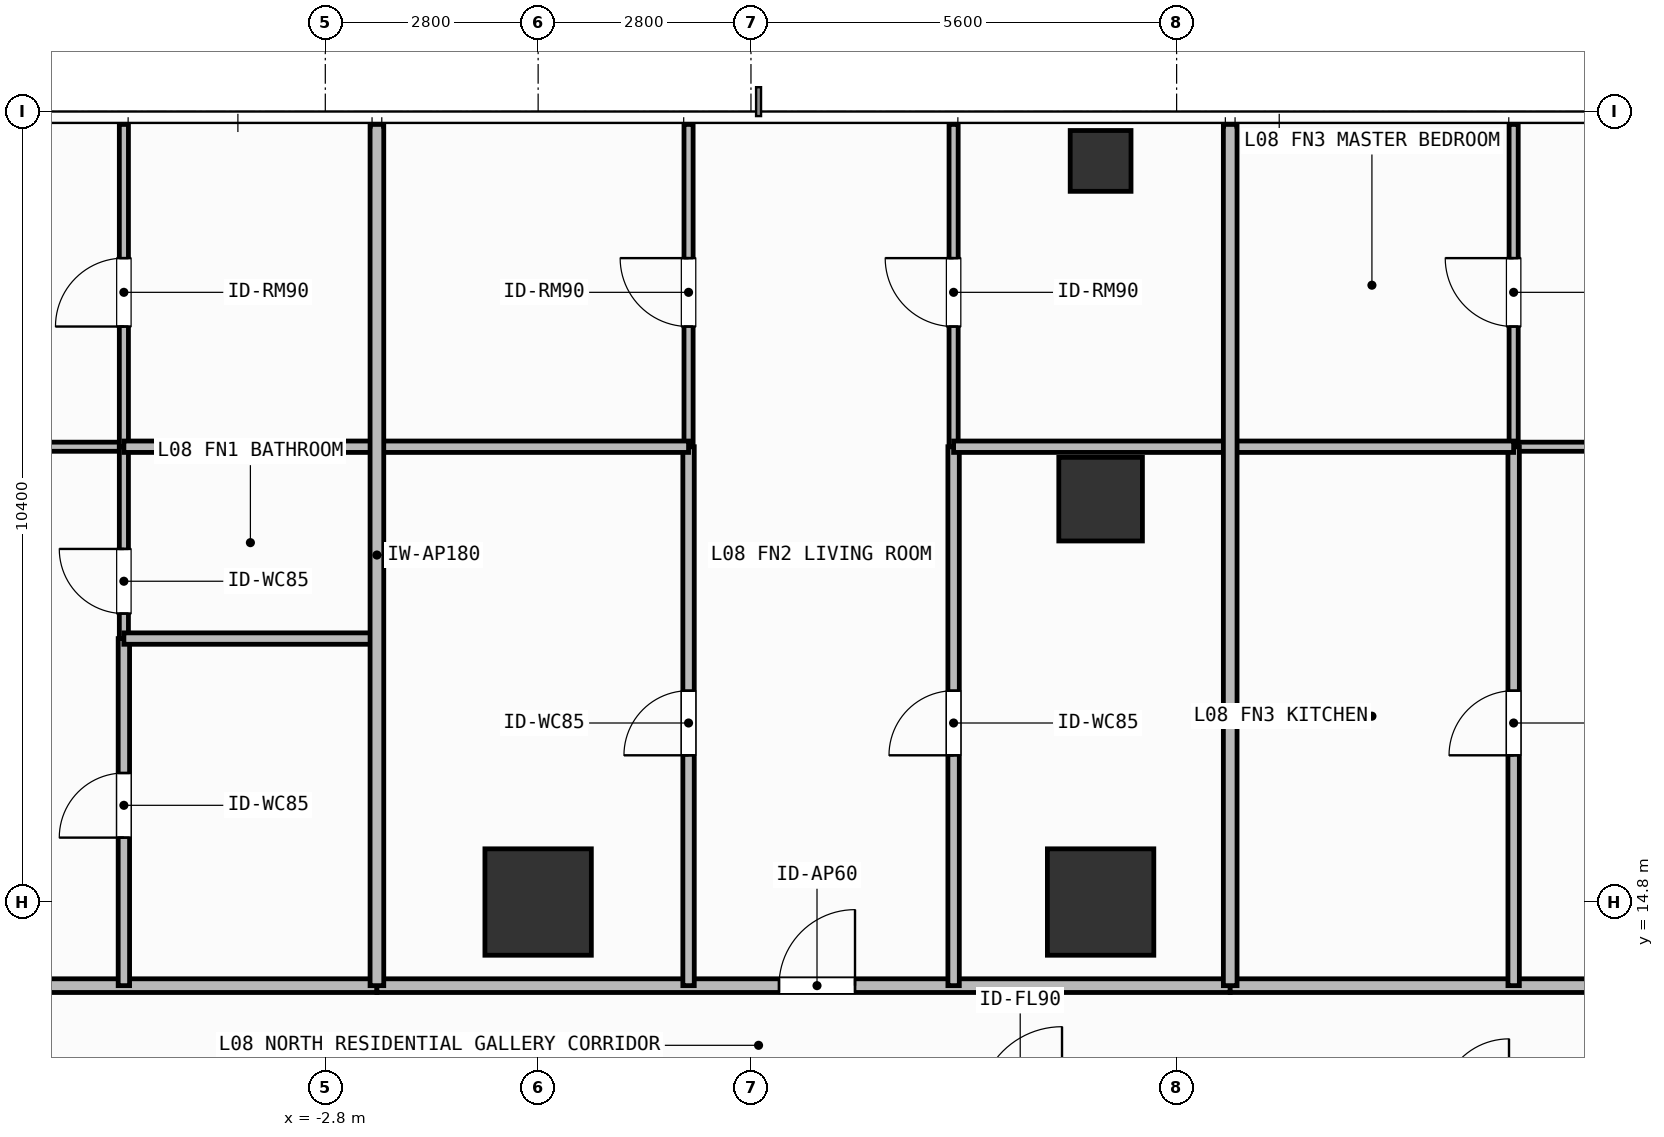
"""IFC4 building model, lengths in metres.
Left out: names, types, materials, properties, quantities, classifications, styles, units other than length and angle.
Written with IfcOpenShell. Run it as: python <this file> out.ifc"""

import sys

from ifc_helpers import new_model, si_unit, direction, frame, frame_2d, origin, origin_2d, place, context, subcontext, project, spatial, rectangle, hollow_rectangle, extrude, element, fill, save


model = new_model("IFC4")
c1 = context("Model", 3, precision=1e-05, world=origin(), true_north=direction((0.0, 1.0)))
c2 = subcontext(c1, "Body", "Model", "MODEL_VIEW")
j1 = project(units=[si_unit("LENGTHUNIT", "METRE"), si_unit("PLANEANGLEUNIT", "RADIAN")], contexts=[c1])
p1 = place(None, origin())
s1 = spatial("IfcSite", under=j1, at=p1, CompositionType="ELEMENT")
p2 = place(p1, origin())
s2 = spatial("IfcBuilding", under=s1, at=p2, CompositionType="ELEMENT")
p3 = place(p2, frame((0.0, 0.0, 30.6)))
s3 = spatial("IfcBuildingStorey", under=s2, at=p3, CompositionType="ELEMENT", Elevation=30.6)
for number, where, z_axis, x_axis in (
    (1, (0.0, 14.8, 0.0), (0.0, 0.0, 1.0), (1.0, 0.0, 0.0)),
    (2, (7.4, 14.8, 0.0), (0.0, 0.0, 1.0), (1.0, 0.0, 0.0)),
):
    element("IfcColumn", number, at=place(p3, frame(where, z_axis=z_axis, x_axis=x_axis)), inside=s3, PredefinedType="COLUMN", context=c2, shape_type="SweptSolid", body=[
        extrude(rectangle(XDim=1.4, YDim=1.4, at=origin_2d()), origin(), (0.0, 0.0, 1.0), 3.9),
    ])
p4 = place(p3, frame((7.4, 20.1, 0.0), z_axis=(0.0, 0.0, 1.0), x_axis=(1.0, 0.0, 0.0)))
e3 = element("IfcColumn", 3, at=p4, inside=s3, PredefinedType="COLUMN", context=c2, shape_type="SweptSolid", body=[
    extrude(rectangle(XDim=1.1, YDim=1.1, at=origin_2d()), origin(), (0.0, 0.0, 1.0), 3.9),
])
p5 = place(p3, frame((7.4, 24.55, 0.0), z_axis=(0.0, 0.0, 1.0), x_axis=(1.0, 0.0, 0.0)))
e4 = element("IfcColumn", 4, at=p5, inside=s3, PredefinedType="COLUMN", context=c2, shape_type="SweptSolid", body=[
    extrude(hollow_rectangle(XDim=0.8, YDim=0.8, WallThickness=0.036, at=origin_2d()), origin(), (0.0, 0.0, 1.0), 3.9),
])
p6 = place(p3, frame((-18.62, 13.7, 0.0), z_axis=(0.0, 0.0, 1.0), x_axis=(1.0, 0.0, 0.0)))
e5 = element("IfcWall", 5, at=p6, inside=s3, PredefinedType="PARTITIONING", context=c2, shape_type="SweptSolid", body=[
    extrude(rectangle(XDim=16.499, YDim=0.18, at=frame_2d((8.25, 0.0))), origin(), (0.0, 0.0, 1.0), 3.68),
])
p7 = place(p6, frame((8.91, 0.0, 0.0)))
e6 = element("IfcOpeningElement", 6, at=p7, cuts=e5, PredefinedType="OPENING", context=c2, shape_type="SweptSolid", body=[
    extrude(rectangle(XDim=1.0, YDim=2.2, at=frame_2d((0.5, 1.1))), frame((0.0, 0.1, 0.0), z_axis=(0.0, -1.0, 0.0), x_axis=(1.0, 0.0, 0.0)), (0.0, 0.0, 1.0), 0.2),
])
p8 = place(p3, frame((-12.818, 20.79, 0.0), z_axis=(0.0, 0.0, 1.0), x_axis=(1.0, 0.0, 0.0)))
e7 = element("IfcWall", 7, at=p8, inside=s3, PredefinedType="PARTITIONING", context=c2, shape_type="SweptSolid", body=[
    extrude(rectangle(XDim=7.368, YDim=0.12, at=frame_2d((3.684, 0.0))), origin(), (0.0, 0.0, 1.0), 3.68),
])
p9 = place(p8, frame((3.322, 0.0, 0.0)))
e8 = element("IfcOpeningElement", 8, at=p9, cuts=e7, PredefinedType="OPENING", context=c2, shape_type="SweptSolid", body=[
    extrude(rectangle(XDim=0.9, YDim=2.1, at=frame_2d((0.45, 1.05))), frame((0.0, 0.07, 0.0), z_axis=(0.0, -1.0, 0.0), x_axis=(1.0, 0.0, 0.0)), (0.0, 0.0, 1.0), 0.14),
])
p10 = place(p3, frame((-5.45, 13.7, 0.0), z_axis=(0.0, 0.0, 1.0), x_axis=(0.0, 1.0, 0.0)))
e9 = element("IfcWall", 9, at=p10, inside=s3, PredefinedType="PARTITIONING", context=c2, shape_type="SweptSolid", body=[
    extrude(rectangle(XDim=4.566, YDim=0.15, at=frame_2d((2.283, 0.0))), origin(), (0.0, 0.0, 1.0), 3.68),
])
p11 = place(p10, frame((1.948, 0.0, 0.0)))
e10 = element("IfcOpeningElement", 10, at=p11, cuts=e9, PredefinedType="OPENING", context=c2, shape_type="SweptSolid", body=[
    extrude(rectangle(XDim=0.85, YDim=2.1, at=frame_2d((0.425, 1.05))), frame((0.0, 0.085, 0.0), z_axis=(0.0, -1.0, 0.0), x_axis=(1.0, 0.0, 0.0)), (0.0, 0.0, 1.0), 0.17),
])
p12 = place(p3, frame((-5.45, 18.266, 0.0), z_axis=(0.0, 0.0, 1.0), x_axis=(0.0, 1.0, 0.0)))
e11 = element("IfcWall", 11, at=p12, inside=s3, PredefinedType="PARTITIONING", context=c2, shape_type="SweptSolid", body=[
    extrude(rectangle(XDim=2.524, YDim=0.12, at=frame_2d((1.262, 0.0))), origin(), (0.0, 0.0, 1.0), 3.68),
])
p13 = place(p12, frame((0.329, 0.0, 0.0)))
e12 = element("IfcOpeningElement", 12, at=p13, cuts=e11, PredefinedType="OPENING", context=c2, shape_type="SweptSolid", body=[
    extrude(rectangle(XDim=0.85, YDim=2.1, at=frame_2d((0.425, 1.05))), frame((0.0, 0.07, 0.0), z_axis=(0.0, -1.0, 0.0), x_axis=(1.0, 0.0, 0.0)), (0.0, 0.0, 1.0), 0.14),
])
p14 = place(p3, frame((-5.45, 20.79, 0.0), z_axis=(0.0, 0.0, 1.0), x_axis=(0.0, 1.0, 0.0)))
e13 = element("IfcWall", 13, at=p14, inside=s3, PredefinedType="PARTITIONING", context=c2, shape_type="SweptSolid", body=[
    extrude(rectangle(XDim=4.24, YDim=0.12, at=frame_2d((2.12, 0.0))), origin(), (0.0, 0.0, 1.0), 3.68),
])
p15 = place(p14, frame((1.581, 0.0, 0.0)))
e14 = element("IfcOpeningElement", 14, at=p15, cuts=e13, PredefinedType="OPENING", context=c2, shape_type="SweptSolid", body=[
    extrude(rectangle(XDim=0.9, YDim=2.1, at=frame_2d((0.45, 1.05))), frame((0.0, 0.07, 0.0), z_axis=(0.0, -1.0, 0.0), x_axis=(1.0, 0.0, 0.0)), (0.0, 0.0, 1.0), 0.14),
])
p16 = place(p3, frame((-2.121, 13.7, 0.0), z_axis=(0.0, 0.0, 1.0), x_axis=(1.0, 0.0, 0.0)))
e15 = element("IfcWall", 15, at=p16, inside=s3, PredefinedType="PARTITIONING", context=c2, shape_type="SweptSolid", body=[
    extrude(rectangle(XDim=11.226, YDim=0.18, at=frame_2d((5.613, 0.0))), origin(), (0.0, 0.0, 1.0), 3.68),
])
p17 = place(p16, frame((5.29, 0.0, 0.0)))
e16 = element("IfcOpeningElement", 16, at=p17, cuts=e15, PredefinedType="OPENING", context=c2, shape_type="SweptSolid", body=[
    extrude(rectangle(XDim=1.0, YDim=2.2, at=frame_2d((0.5, 1.1))), frame((0.0, 0.1, 0.0), z_axis=(0.0, -1.0, 0.0), x_axis=(1.0, 0.0, 0.0)), (0.0, 0.0, 1.0), 0.2),
])
p18 = place(p3, frame((1.979, 13.7, 0.0), z_axis=(0.0, 0.0, 1.0), x_axis=(0.0, 1.0, 0.0)))
e17 = element("IfcWall", 17, at=p18, inside=s3, PredefinedType="PARTITIONING", context=c2, shape_type="SweptSolid", body=[
    extrude(rectangle(XDim=7.09, YDim=0.15, at=frame_2d((3.545, 0.0))), origin(), (0.0, 0.0, 1.0), 3.68),
])
p19 = place(p18, frame((3.03, 0.0, 0.0)))
e18 = element("IfcOpeningElement", 18, at=p19, cuts=e17, PredefinedType="OPENING", context=c2, shape_type="SweptSolid", body=[
    extrude(rectangle(XDim=0.85, YDim=2.1, at=frame_2d((0.425, 1.05))), frame((0.0, 0.085, 0.0), z_axis=(0.0, -1.0, 0.0), x_axis=(1.0, 0.0, 0.0)), (0.0, 0.0, 1.0), 0.17),
])
p20 = place(p3, frame((1.979, 20.79, 0.0), z_axis=(0.0, 0.0, 1.0), x_axis=(0.0, 1.0, 0.0)))
e19 = element("IfcWall", 19, at=p20, inside=s3, PredefinedType="PARTITIONING", context=c2, shape_type="SweptSolid", body=[
    extrude(rectangle(XDim=4.24, YDim=0.12, at=frame_2d((2.12, 0.0))), origin(), (0.0, 0.0, 1.0), 3.68),
])
p21 = place(p20, frame((1.581, 0.0, 0.0)))
e20 = element("IfcOpeningElement", 20, at=p21, cuts=e19, PredefinedType="OPENING", context=c2, shape_type="SweptSolid", body=[
    extrude(rectangle(XDim=0.9, YDim=2.1, at=frame_2d((0.45, 1.05))), frame((0.0, 0.07, 0.0), z_axis=(0.0, -1.0, 0.0), x_axis=(1.0, 0.0, 0.0)), (0.0, 0.0, 1.0), 0.14),
])
p22 = place(p3, frame((5.466, 13.7, 0.0), z_axis=(0.0, 0.0, 1.0), x_axis=(0.0, 1.0, 0.0)))
e21 = element("IfcWall", 21, at=p22, inside=s3, PredefinedType="PARTITIONING", context=c2, shape_type="SweptSolid", body=[
    extrude(rectangle(XDim=7.09, YDim=0.15, at=frame_2d((3.545, 0.0))), origin(), (0.0, 0.0, 1.0), 3.68),
])
p23 = place(p22, frame((3.03, 0.0, 0.0)))
e22 = element("IfcOpeningElement", 22, at=p23, cuts=e21, PredefinedType="OPENING", context=c2, shape_type="SweptSolid", body=[
    extrude(rectangle(XDim=0.85, YDim=2.1, at=frame_2d((0.425, 1.05))), frame((0.0, 0.085, 0.0), z_axis=(0.0, -1.0, 0.0), x_axis=(1.0, 0.0, 0.0)), (0.0, 0.0, 1.0), 0.17),
])
p24 = place(p3, frame((5.466, 20.79, 0.0), z_axis=(0.0, 0.0, 1.0), x_axis=(0.0, 1.0, 0.0)))
e23 = element("IfcWall", 23, at=p24, inside=s3, PredefinedType="PARTITIONING", context=c2, shape_type="SweptSolid", body=[
    extrude(rectangle(XDim=4.24, YDim=0.12, at=frame_2d((2.12, 0.0))), origin(), (0.0, 0.0, 1.0), 3.68),
])
p25 = place(p24, frame((1.581, 0.0, 0.0)))
e24 = element("IfcOpeningElement", 24, at=p25, cuts=e23, PredefinedType="OPENING", context=c2, shape_type="SweptSolid", body=[
    extrude(rectangle(XDim=0.9, YDim=2.1, at=frame_2d((0.45, 1.05))), frame((0.0, 0.07, 0.0), z_axis=(0.0, -1.0, 0.0), x_axis=(1.0, 0.0, 0.0)), (0.0, 0.0, 1.0), 0.14),
])
p26 = place(p3, frame((9.105, 13.7, 0.0), z_axis=(0.0, 0.0, 1.0), x_axis=(1.0, 0.0, 0.0)))
e25 = element("IfcWall", 25, at=p26, inside=s3, PredefinedType="PARTITIONING", context=c2, shape_type="SweptSolid", body=[
    extrude(rectangle(XDim=15.315, YDim=0.18, at=frame_2d((7.657, 0.0))), origin(), (0.0, 0.0, 1.0), 3.68),
])
p27 = place(p26, frame((7.516, 0.0, 0.0)))
e26 = element("IfcOpeningElement", 26, at=p27, cuts=e25, PredefinedType="OPENING", context=c2, shape_type="SweptSolid", body=[
    extrude(rectangle(XDim=1.0, YDim=2.2, at=frame_2d((0.5, 1.1))), frame((0.0, 0.1, 0.0), z_axis=(0.0, -1.0, 0.0), x_axis=(1.0, 0.0, 0.0)), (0.0, 0.0, 1.0), 0.2),
])
p28 = place(p3, frame((12.834, 20.79, 0.0), z_axis=(0.0, 0.0, 1.0), x_axis=(1.0, 0.0, 0.0)))
e27 = element("IfcWall", 27, at=p28, inside=s3, PredefinedType="PARTITIONING", context=c2, shape_type="SweptSolid", body=[
    extrude(rectangle(XDim=8.496, YDim=0.12, at=frame_2d((4.248, 0.0))), origin(), (0.0, 0.0, 1.0), 3.68),
])
p29 = place(p28, frame((3.709, 0.0, 0.0)))
e28 = element("IfcOpeningElement", 28, at=p29, cuts=e27, PredefinedType="OPENING", context=c2, shape_type="SweptSolid", body=[
    extrude(rectangle(XDim=0.9, YDim=2.1, at=frame_2d((0.45, 1.05))), frame((0.0, 0.07, 0.0), z_axis=(0.0, -1.0, 0.0), x_axis=(1.0, 0.0, 0.0)), (0.0, 0.0, 1.0), 0.14),
])
p30 = place(p3, frame((12.834, 13.7, 0.0), z_axis=(0.0, 0.0, 1.0), x_axis=(0.0, 1.0, 0.0)))
e29 = element("IfcWall", 29, at=p30, inside=s3, PredefinedType="PARTITIONING", context=c2, shape_type="SweptSolid", body=[
    extrude(rectangle(XDim=7.09, YDim=0.15, at=frame_2d((3.545, 0.0))), origin(), (0.0, 0.0, 1.0), 3.68),
])
p31 = place(p30, frame((3.03, 0.0, 0.0)))
e30 = element("IfcOpeningElement", 30, at=p31, cuts=e29, PredefinedType="OPENING", context=c2, shape_type="SweptSolid", body=[
    extrude(rectangle(XDim=0.85, YDim=2.1, at=frame_2d((0.425, 1.05))), frame((0.0, 0.085, 0.0), z_axis=(0.0, -1.0, 0.0), x_axis=(1.0, 0.0, 0.0)), (0.0, 0.0, 1.0), 0.17),
])
p32 = place(p3, frame((12.834, 20.79, 0.0), z_axis=(0.0, 0.0, 1.0), x_axis=(0.0, 1.0, 0.0)))
e31 = element("IfcWall", 31, at=p32, inside=s3, PredefinedType="PARTITIONING", context=c2, shape_type="SweptSolid", body=[
    extrude(rectangle(XDim=4.24, YDim=0.12, at=frame_2d((2.12, 0.0))), origin(), (0.0, 0.0, 1.0), 3.68),
])
p33 = place(p32, frame((1.581, 0.0, 0.0)))
e32 = element("IfcOpeningElement", 32, at=p33, cuts=e31, PredefinedType="OPENING", context=c2, shape_type="SweptSolid", body=[
    extrude(rectangle(XDim=0.9, YDim=2.1, at=frame_2d((0.45, 1.05))), frame((0.0, 0.07, 0.0), z_axis=(0.0, -1.0, 0.0), x_axis=(1.0, 0.0, 0.0)), (0.0, 0.0, 1.0), 0.14),
])
for number, where, z_axis, x_axis in (
    (33, (-5.45, 18.266, 0.0), (0.0, 0.0, 1.0), (1.0, 0.0, 0.0)),
    (34, (-5.45, 20.79, 0.0), (0.0, 0.0, 1.0), (1.0, 0.0, 0.0)),
):
    element("IfcWall", number, at=place(p3, frame(where, z_axis=z_axis, x_axis=x_axis)), inside=s3, PredefinedType="PARTITIONING", context=c2, shape_type="SweptSolid", body=[
        extrude(rectangle(XDim=3.329, YDim=0.15, at=frame_2d((1.665, 0.0))), origin(), (0.0, 0.0, 1.0), 3.68),
    ])
p34 = place(p3, frame((-2.121, 20.79, 0.0), z_axis=(0.0, 0.0, 1.0), x_axis=(1.0, 0.0, 0.0)))
e35 = element("IfcWall", 35, at=p34, inside=s3, PredefinedType="PARTITIONING", context=c2, shape_type="SweptSolid", body=[
    extrude(rectangle(XDim=4.1, YDim=0.15, at=frame_2d((2.05, 0.0))), origin(), (0.0, 0.0, 1.0), 3.68),
])
p35 = place(p3, frame((5.466, 20.79, 0.0), z_axis=(0.0, 0.0, 1.0), x_axis=(1.0, 0.0, 0.0)))
e36 = element("IfcWall", 36, at=p35, inside=s3, PredefinedType="PARTITIONING", context=c2, shape_type="SweptSolid", body=[
    extrude(rectangle(XDim=3.639, YDim=0.15, at=frame_2d((1.819, 0.0))), origin(), (0.0, 0.0, 1.0), 3.68),
])
p36 = place(p3, frame((-2.121, 13.7, 0.0), z_axis=(0.0, 0.0, 1.0), x_axis=(0.0, 1.0, 0.0)))
e37 = element("IfcWall", 37, at=p36, inside=s3, PredefinedType="PARTITIONING", context=c2, shape_type="SweptSolid", body=[
    extrude(rectangle(XDim=11.33, YDim=0.18, at=frame_2d((5.665, 0.0))), origin(), (0.0, 0.0, 1.0), 3.68),
])
p37 = place(p3, frame((9.105, 20.79, 0.0), z_axis=(0.0, 0.0, 1.0), x_axis=(1.0, 0.0, 0.0)))
e38 = element("IfcWall", 38, at=p37, inside=s3, PredefinedType="PARTITIONING", context=c2, shape_type="SweptSolid", body=[
    extrude(rectangle(XDim=3.729, YDim=0.15, at=frame_2d((1.865, 0.0))), origin(), (0.0, 0.0, 1.0), 3.68),
])
p38 = place(p3, frame((9.105, 13.7, 0.0), z_axis=(0.0, 0.0, 1.0), x_axis=(0.0, 1.0, 0.0)))
e39 = element("IfcWall", 39, at=p38, inside=s3, PredefinedType="PARTITIONING", context=c2, shape_type="SweptSolid", body=[
    extrude(rectangle(XDim=11.33, YDim=0.18, at=frame_2d((5.665, 0.0))), origin(), (0.0, 0.0, 1.0), 3.68),
])
p39 = place(p11, origin())
e40 = element("IfcDoor", 40, at=p39, inside=s3, OperationType="SINGLE_SWING_LEFT", PredefinedType="DOOR", context=c2, shape_type="SweptSolid", body=[
    extrude(rectangle(XDim=0.85, YDim=2.1, at=frame_2d((0.425, 1.05))), frame((0.0, 0.025, 0.0), z_axis=(0.0, -1.0, 0.0), x_axis=(1.0, 0.0, 0.0)), (0.0, 0.0, 1.0), 0.05),
])
fill(e10, e40)
p40 = place(p13, origin())
e41 = element("IfcDoor", 41, at=p40, inside=s3, OperationType="SINGLE_SWING_RIGHT", PredefinedType="DOOR", context=c2, shape_type="SweptSolid", body=[
    extrude(rectangle(XDim=0.85, YDim=2.1, at=frame_2d((0.425, 1.05))), frame((0.0, 0.025, 0.0), z_axis=(0.0, -1.0, 0.0), x_axis=(1.0, 0.0, 0.0)), (0.0, 0.0, 1.0), 0.05),
])
fill(e12, e41)
p41 = place(p15, origin())
e42 = element("IfcDoor", 42, at=p41, inside=s3, OperationType="SINGLE_SWING_LEFT", PredefinedType="DOOR", context=c2, shape_type="SweptSolid", body=[
    extrude(rectangle(XDim=0.9, YDim=2.1, at=frame_2d((0.45, 1.05))), frame((0.0, 0.025, 0.0), z_axis=(0.0, -1.0, 0.0), x_axis=(1.0, 0.0, 0.0)), (0.0, 0.0, 1.0), 0.05),
])
fill(e14, e42)
p42 = place(p17, origin())
e43 = element("IfcDoor", 43, at=p42, inside=s3, OperationType="SINGLE_SWING_RIGHT", PredefinedType="DOOR", context=c2, shape_type="SweptSolid", body=[
    extrude(rectangle(XDim=1.0, YDim=2.2, at=frame_2d((0.5, 1.1))), frame((0.0, 0.025, 0.0), z_axis=(0.0, -1.0, 0.0), x_axis=(1.0, 0.0, 0.0)), (0.0, 0.0, 1.0), 0.05),
])
fill(e16, e43)
p43 = place(p19, origin())
e44 = element("IfcDoor", 44, at=p43, inside=s3, OperationType="SINGLE_SWING_LEFT", PredefinedType="DOOR", context=c2, shape_type="SweptSolid", body=[
    extrude(rectangle(XDim=0.85, YDim=2.1, at=frame_2d((0.425, 1.05))), frame((0.0, 0.025, 0.0), z_axis=(0.0, -1.0, 0.0), x_axis=(1.0, 0.0, 0.0)), (0.0, 0.0, 1.0), 0.05),
])
fill(e18, e44)
p44 = place(p21, origin())
e45 = element("IfcDoor", 45, at=p44, inside=s3, OperationType="SINGLE_SWING_RIGHT", PredefinedType="DOOR", context=c2, shape_type="SweptSolid", body=[
    extrude(rectangle(XDim=0.9, YDim=2.1, at=frame_2d((0.45, 1.05))), frame((0.0, 0.025, 0.0), z_axis=(0.0, -1.0, 0.0), x_axis=(1.0, 0.0, 0.0)), (0.0, 0.0, 1.0), 0.05),
])
fill(e20, e45)
p45 = place(p23, origin())
e46 = element("IfcDoor", 46, at=p45, inside=s3, OperationType="SINGLE_SWING_LEFT", PredefinedType="DOOR", context=c2, shape_type="SweptSolid", body=[
    extrude(rectangle(XDim=0.85, YDim=2.1, at=frame_2d((0.425, 1.05))), frame((0.0, 0.025, 0.0), z_axis=(0.0, -1.0, 0.0), x_axis=(1.0, 0.0, 0.0)), (0.0, 0.0, 1.0), 0.05),
])
fill(e22, e46)
p46 = place(p25, origin())
e47 = element("IfcDoor", 47, at=p46, inside=s3, OperationType="SINGLE_SWING_RIGHT", PredefinedType="DOOR", context=c2, shape_type="SweptSolid", body=[
    extrude(rectangle(XDim=0.9, YDim=2.1, at=frame_2d((0.45, 1.05))), frame((0.0, 0.025, 0.0), z_axis=(0.0, -1.0, 0.0), x_axis=(1.0, 0.0, 0.0)), (0.0, 0.0, 1.0), 0.05),
])
fill(e24, e47)
p47 = place(p31, origin())
e48 = element("IfcDoor", 48, at=p47, inside=s3, OperationType="SINGLE_SWING_LEFT", PredefinedType="DOOR", context=c2, shape_type="SweptSolid", body=[
    extrude(rectangle(XDim=0.85, YDim=2.1, at=frame_2d((0.425, 1.05))), frame((0.0, 0.025, 0.0), z_axis=(0.0, -1.0, 0.0), x_axis=(1.0, 0.0, 0.0)), (0.0, 0.0, 1.0), 0.05),
])
fill(e30, e48)
p48 = place(p33, origin())
e49 = element("IfcDoor", 49, at=p48, inside=s3, OperationType="SINGLE_SWING_RIGHT", PredefinedType="DOOR", context=c2, shape_type="SweptSolid", body=[
    extrude(rectangle(XDim=0.9, YDim=2.1, at=frame_2d((0.45, 1.05))), frame((0.0, 0.025, 0.0), z_axis=(0.0, -1.0, 0.0), x_axis=(1.0, 0.0, 0.0)), (0.0, 0.0, 1.0), 0.05),
])
fill(e32, e49)
save(model, sys.argv[1])
